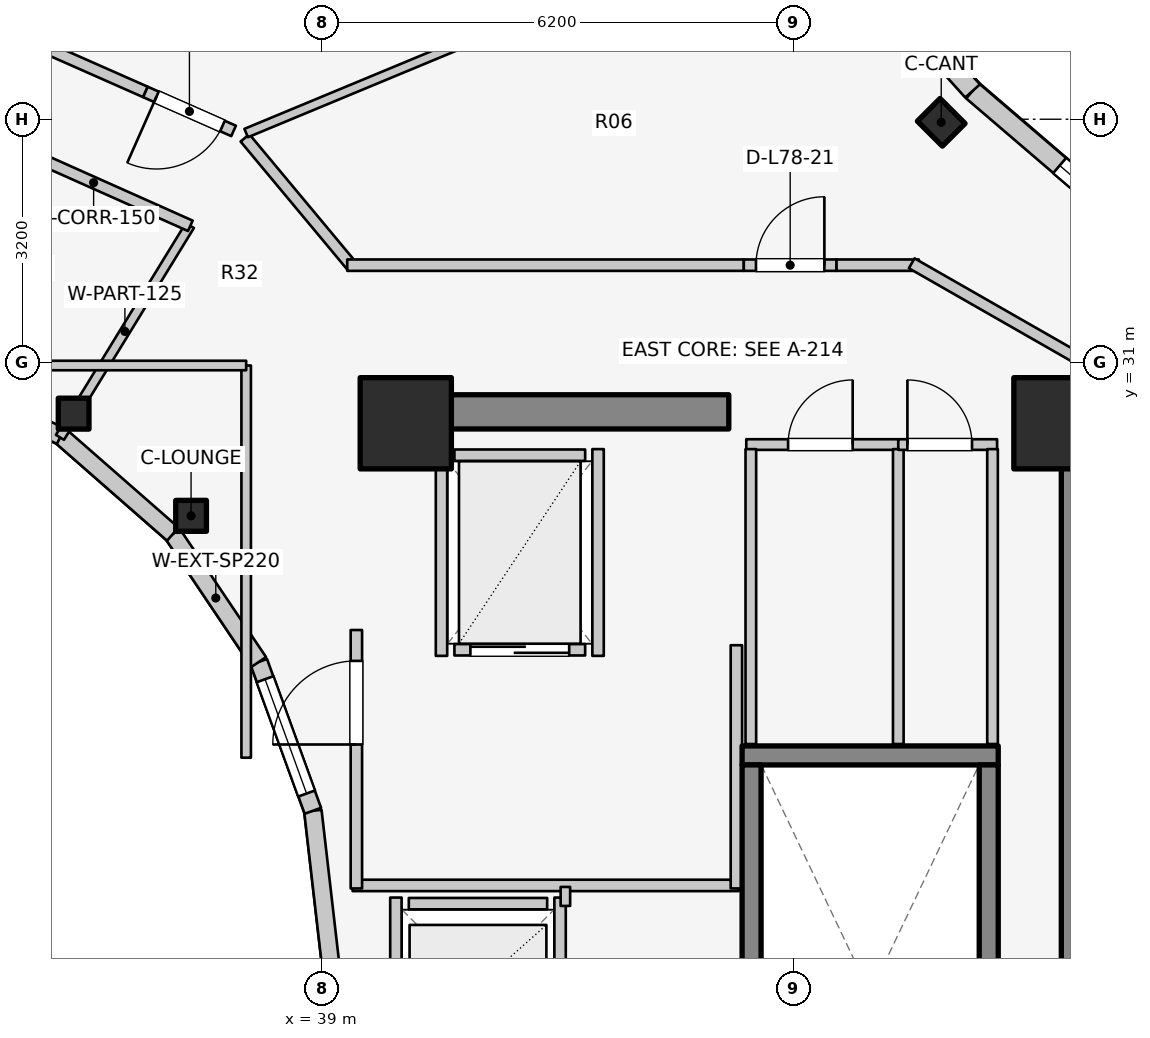
"""IFC4 building model, lengths in metres.
Left out: names, types, materials, properties, quantities, classifications, styles, units other than length and angle.
Written with IfcOpenShell. Run it as: python <this file> out.ifc"""

import sys

from ifc_helpers import new_model, si_unit, direction, frame, frame_2d, origin, origin_2d, place, context, subcontext, project, spatial, rectangle, i_section, extrude, element, fill, save


model = new_model("IFC4")
c1 = context("Model", 3, precision=1e-05, world=origin(), true_north=direction((0.0, 1.0)))
c2 = subcontext(c1, "Body", "Model", "MODEL_VIEW")
j1 = project(units=[si_unit("LENGTHUNIT", "METRE"), si_unit("PLANEANGLEUNIT", "RADIAN")], contexts=[c1])
p1 = place(None, origin())
s1 = spatial("IfcSite", under=j1, at=p1, CompositionType="ELEMENT")
p2 = place(p1, origin())
s2 = spatial("IfcBuilding", under=s1, at=p2, CompositionType="ELEMENT")
p3 = place(p2, frame((0.0, 0.0, 256.8)))
s3 = spatial("IfcBuildingStorey", under=s2, at=p3, CompositionType="ELEMENT", Elevation=256.8)
p4 = place(p3, frame((48.95, 17.05, 0.0), z_axis=(0.0, 0.0, 1.0), x_axis=(0.0, 1.0, 0.0)))
e1 = element("IfcWall", 1, at=p4, inside=s3, PredefinedType="SHEAR", context=c2, shape_type="SweptSolid", body=[
    extrude(rectangle(XDim=12.8, YDim=0.45, at=frame_2d((6.4, 0.0))), origin(), (0.0, 0.0, 1.0), 3.6),
])
p5 = place(p3, frame((39.85, 30.35, 0.0), z_axis=(0.0, 0.0, 1.0), x_axis=(1.0, 0.0, 0.0)))
e2 = element("IfcWall", 2, at=p5, inside=s3, PredefinedType="SHEAR", context=c2, shape_type="SweptSolid", body=[
    extrude(rectangle(XDim=4.5, YDim=0.45, at=frame_2d((2.25, 0.0))), origin(), (0.0, 0.0, 1.0), 3.6),
])
p6 = place(p3, frame((44.525, 25.83, 0.0), z_axis=(0.0, 0.0, 1.0), x_axis=(1.0, 0.0, 0.0)))
e3 = element("IfcWall", 3, at=p6, inside=s3, PredefinedType="SOLIDWALL", context=c2, shape_type="SweptSolid", body=[
    extrude(rectangle(XDim=3.37, YDim=0.25, at=frame_2d((1.685, 0.0))), origin(), (0.0, 0.0, 1.0), 3.6),
])
for number, where, z_axis, x_axis in (
    (4, (44.65, 17.895, 0.0), (0.0, 0.0, 1.0), (0.0, 1.0, 0.0)),
    (5, (47.77, 17.895, 0.0), (0.0, 0.0, 1.0), (0.0, 1.0, 0.0)),
):
    element("IfcWall", number, at=place(p3, frame(where, z_axis=z_axis, x_axis=x_axis)), inside=s3, PredefinedType="SOLIDWALL", context=c2, shape_type="SweptSolid", body=[
        extrude(rectangle(XDim=7.81, YDim=0.25, at=frame_2d((3.905, 0.0))), origin(), (0.0, 0.0, 1.0), 3.6),
    ])
for number, where, z_axis, x_axis in (
    (6, (48.7, 30.2, 0.0), (0.0, 0.0, 1.0), (1.0, 0.0, 0.0)),
    (7, (40.1, 30.2, 0.0), (0.0, 0.0, 1.0), (1.0, 0.0, 0.0)),
):
    element("IfcColumn", number, at=place(p3, frame(where, z_axis=z_axis, x_axis=x_axis)), inside=s3, PredefinedType="COLUMN", context=c2, shape_type="SweptSolid", body=[
        extrude(rectangle(XDim=1.2, YDim=1.2, at=origin_2d()), origin(), (0.0, 0.0, 1.0), 3.6),
    ])
p7 = place(p3, frame((37.275, 28.982, 0.0), z_axis=(0.0, 0.0, 1.0), x_axis=(1.0, 0.0, 0.0)))
e8 = element("IfcColumn", 8, at=p7, inside=s3, PredefinedType="COLUMN", context=c2, shape_type="SweptSolid", body=[
    extrude(i_section(OverallWidth=0.404, OverallDepth=0.407, WebThickness=0.027, FlangeThickness=0.044, FilletRadius=0.025, at=origin_2d()), origin(), (0.0, 0.0, 1.0), 3.6),
])
p8 = place(p3, frame((47.145, 34.159, 0.0), z_axis=(0.0, 0.0, 1.0), x_axis=(0.707106781187, 0.707106781187, 0.0)))
e9 = element("IfcColumn", 9, at=p8, inside=s3, PredefinedType="COLUMN", context=c2, shape_type="SweptSolid", body=[
    extrude(i_section(OverallWidth=0.422, OverallDepth=0.465, WebThickness=0.045, FlangeThickness=0.073, FilletRadius=0.025, at=origin_2d()), origin(), (0.0, 0.0, 1.0), 3.6),
])
p9 = place(p3, frame((35.73, 30.327, 0.0), z_axis=(0.0, 0.0, 1.0), x_axis=(1.0, 0.0, 0.0)))
e10 = element("IfcColumn", 10, at=p9, inside=s3, PredefinedType="COLUMN", context=c2, shape_type="SweptSolid", body=[
    extrude(i_section(OverallWidth=0.404, OverallDepth=0.407, WebThickness=0.027, FlangeThickness=0.044, FilletRadius=0.025, at=origin_2d()), origin(), (0.0, 0.0, 1.0), 3.6),
])
p10 = place(p3, frame((39.12, 23.0, 0.0), z_axis=(0.0, 0.0, 1.0), x_axis=(-0.114711713601, 0.993398823617, 0.0)))
e11 = element("IfcWall", 11, at=p10, inside=s3, PredefinedType="STANDARD", context=c2, shape_type="SweptSolid", body=[
    extrude(rectangle(XDim=2.115, YDim=0.23, at=frame_2d((1.058, 0.0))), origin(), (0.0, 0.0, 1.0), 3.06),
])
p11 = place(p3, frame((38.877, 25.102, 0.0), z_axis=(0.0, 0.0, 1.0), x_axis=(-0.341423187295, 0.93990968033, 0.0)))
e12 = element("IfcWall", 12, at=p11, inside=s3, PredefinedType="STANDARD", context=c2, shape_type="SweptSolid", body=[
    extrude(rectangle(XDim=2.084, YDim=0.23, at=frame_2d((1.042, 0.0))), origin(), (0.0, 0.0, 1.0), 3.06),
])
p12 = place(p11, frame((0.242, 0.0, 0.85)))
e13 = element("IfcOpeningElement", 13, at=p12, cuts=e12, PredefinedType="OPENING", context=c2, shape_type="SweptSolid", body=[
    extrude(rectangle(XDim=1.6, YDim=1.65, at=frame_2d((0.8, 0.825))), frame((0.0, 0.125, 0.0), z_axis=(0.0, -1.0, 0.0), x_axis=(1.0, 0.0, 0.0)), (0.0, 0.0, 1.0), 0.25),
])
p13 = place(p3, frame((38.166, 27.06, 0.0), z_axis=(0.0, 0.0, 1.0), x_axis=(-0.558197800898, 0.829707909492, 0.0)))
e14 = element("IfcWall", 14, at=p13, inside=s3, PredefinedType="STANDARD", context=c2, shape_type="SweptSolid", body=[
    extrude(rectangle(XDim=2.027, YDim=0.23, at=frame_2d((1.013, 0.0))), origin(), (0.0, 0.0, 1.0), 1.72),
])
p14 = place(p3, frame((37.035, 28.742, 0.0), z_axis=(0.0, 0.0, 1.0), x_axis=(-0.752576694707, 0.658504607869, 0.0)))
e15 = element("IfcWall", 15, at=p14, inside=s3, PredefinedType="STANDARD", context=c2, shape_type="SweptSolid", body=[
    extrude(rectangle(XDim=1.959, YDim=0.23, at=frame_2d((0.98, 0.0))), origin(), (0.0, 0.0, 1.0), 1.72),
])
p15 = place(p3, frame((35.56, 30.032, 0.0), z_axis=(0.0, 0.0, 1.0), x_axis=(-0.904179699603, 0.427152280606, 0.0)))
e16 = element("IfcWall", 16, at=p15, inside=s3, PredefinedType="STANDARD", context=c2, shape_type="SweptSolid", body=[
    extrude(rectangle(XDim=1.899, YDim=0.23, at=frame_2d((0.95, 0.0))), origin(), (0.0, 0.0, 1.0), 1.72),
])
p16 = place(p3, frame((50.761, 31.829, 0.0), z_axis=(0.0, 0.0, 1.0), x_axis=(-0.759587504333, 0.650405122413, 0.0)))
e17 = element("IfcWall", 17, at=p16, inside=s3, PredefinedType="STANDARD", context=c2, shape_type="SweptSolid", body=[
    extrude(rectangle(XDim=4.217, YDim=0.26, at=frame_2d((2.109, 0.0))), origin(), (0.0, 0.0, 1.0), 1.72),
])
p17 = place(p16, frame((1.509, 0.0, 0.15)))
e18 = element("IfcOpeningElement", 18, at=p17, cuts=e17, PredefinedType="OPENING", context=c2, shape_type="SweptSolid", body=[
    extrude(rectangle(XDim=1.2, YDim=0.9, at=frame_2d((0.6, 0.45))), frame((0.0, 0.14, 0.0), z_axis=(0.0, -1.0, 0.0), x_axis=(1.0, 0.0, 0.0)), (0.0, 0.0, 1.0), 0.28),
])
p18 = place(p3, frame((47.558, 34.572, 0.0), z_axis=(0.0, 0.0, 1.0), x_axis=(-0.668903560134, 0.743349196031, 0.0)))
e19 = element("IfcWall", 19, at=p18, inside=s3, PredefinedType="STANDARD", context=c2, shape_type="SweptSolid", body=[
    extrude(rectangle(XDim=5.513, YDim=0.26, at=frame_2d((2.756, 0.0))), origin(), (0.0, 0.0, 1.0), 1.72),
])
p19 = place(p3, frame((40.14, 23.88, 0.0), z_axis=(0.0, 0.0, 1.0), x_axis=(1.0, 0.0, 0.0)))
e20 = element("IfcWall", 20, at=p19, inside=s3, PredefinedType="SOLIDWALL", context=c2, shape_type="SweptSolid", body=[
    extrude(rectangle(XDim=1.82, YDim=0.15, at=frame_2d((0.91, 0.0))), origin(), (0.0, 0.0, 1.0), 2.62),
])
p20 = place(p3, frame((39.97, 21.64, 0.0), z_axis=(0.0, 0.0, 1.0), x_axis=(0.0, 1.0, 0.0)))
e21 = element("IfcWall", 21, at=p20, inside=s3, PredefinedType="SOLIDWALL", context=c2, shape_type="SweptSolid", body=[
    extrude(rectangle(XDim=2.32, YDim=0.15, at=frame_2d((1.16, 0.0))), origin(), (0.0, 0.0, 1.0), 2.62),
])
p21 = place(p3, frame((42.13, 21.64, 0.0), z_axis=(0.0, 0.0, 1.0), x_axis=(0.0, 1.0, 0.0)))
e22 = element("IfcWall", 22, at=p21, inside=s3, PredefinedType="SOLIDWALL", context=c2, shape_type="SweptSolid", body=[
    extrude(rectangle(XDim=2.32, YDim=0.15, at=frame_2d((1.16, 0.0))), origin(), (0.0, 0.0, 1.0), 3.075),
])
p22 = place(p3, frame((40.74, 27.22, 0.0), z_axis=(0.0, 0.0, 1.0), x_axis=(1.0, 0.0, 0.0)))
e23 = element("IfcWall", 23, at=p22, inside=s3, PredefinedType="SOLIDWALL", context=c2, shape_type="SweptSolid", body=[
    extrude(rectangle(XDim=1.72, YDim=0.15, at=frame_2d((0.86, 0.0))), origin(), (0.0, 0.0, 1.0), 3.075),
])
p23 = place(p22, frame((0.21, 0.0, 0.0)))
e24 = element("IfcOpeningElement", 24, at=p23, cuts=e23, PredefinedType="OPENING", context=c2, shape_type="SweptSolid", body=[
    extrude(rectangle(XDim=1.3, YDim=2.1, at=frame_2d((0.65, 1.05))), frame((0.0, 0.085, 0.0), z_axis=(0.0, -1.0, 0.0), x_axis=(1.0, 0.0, 0.0)), (0.0, 0.0, 1.0), 0.17),
])
p24 = place(p3, frame((40.74, 29.78, 0.0), z_axis=(0.0, 0.0, 1.0), x_axis=(1.0, 0.0, 0.0)))
e25 = element("IfcWall", 25, at=p24, inside=s3, PredefinedType="SOLIDWALL", context=c2, shape_type="SweptSolid", body=[
    extrude(rectangle(XDim=1.72, YDim=0.15, at=frame_2d((0.86, 0.0))), origin(), (0.0, 0.0, 1.0), 3.075),
])
for number, where, z_axis, x_axis in (
    (26, (40.57, 27.14, 0.0), (0.0, 0.0, 1.0), (0.0, 1.0, 0.0)),
    (27, (42.63, 27.14, 0.0), (0.0, 0.0, 1.0), (0.0, 1.0, 0.0)),
):
    element("IfcWall", number, at=place(p3, frame(where, z_axis=z_axis, x_axis=x_axis)), inside=s3, PredefinedType="SOLIDWALL", context=c2, shape_type="SweptSolid", body=[
        extrude(rectangle(XDim=2.72, YDim=0.15, at=frame_2d((1.36, 0.0))), origin(), (0.0, 0.0, 1.0), 3.075),
    ])
p25 = place(p3, frame((39.4, 24.12, 0.0), z_axis=(0.0, 0.0, 1.0), x_axis=(1.0, 0.0, 0.0)))
e28 = element("IfcWall", 28, at=p25, inside=s3, PredefinedType="PARTITIONING", context=c2, shape_type="SweptSolid", body=[
    extrude(rectangle(XDim=5.08, YDim=0.15, at=frame_2d((2.54, 0.0))), origin(), (0.0, 0.0, 1.0), 2.62),
])
p26 = place(p3, frame((44.45, 24.08, 0.0), z_axis=(0.0, 0.0, 1.0), x_axis=(0.0, 1.0, 0.0)))
e29 = element("IfcWall", 29, at=p26, inside=s3, PredefinedType="PARTITIONING", context=c2, shape_type="SweptSolid", body=[
    extrude(rectangle(XDim=3.2, YDim=0.15, at=frame_2d((1.6, 0.0))), origin(), (0.0, 0.0, 1.0), 3.075),
])
p27 = place(p3, frame((39.45, 24.08, 0.0), z_axis=(0.0, 0.0, 1.0), x_axis=(0.0, 1.0, 0.0)))
e30 = element("IfcWall", 30, at=p27, inside=s3, PredefinedType="PARTITIONING", context=c2, shape_type="SweptSolid", body=[
    extrude(rectangle(XDim=3.4, YDim=0.15, at=frame_2d((1.7, 0.0))), origin(), (0.0, 0.0, 1.0), 3.075),
])
p28 = place(p27, frame((1.894, 0.0, 0.0)))
e31 = element("IfcOpeningElement", 31, at=p28, cuts=e30, PredefinedType="OPENING", context=c2, shape_type="SweptSolid", body=[
    extrude(rectangle(XDim=1.1, YDim=2.1, at=frame_2d((0.55, 1.05))), frame((0.0, 0.085, 0.0), z_axis=(0.0, -1.0, 0.0), x_axis=(1.0, 0.0, 0.0)), (0.0, 0.0, 1.0), 0.17),
])
p29 = place(p3, frame((42.2, 23.85, 0.0), z_axis=(0.0, 0.0, 1.0), x_axis=(0.0, 1.0, 0.0)))
e32 = element("IfcWall", 32, at=p29, inside=s3, PredefinedType="PARTITIONING", context=c2, shape_type="SweptSolid", body=[
    extrude(rectangle(XDim=0.25, YDim=0.125, at=frame_2d((0.125, 0.0))), origin(), (0.0, 0.0, 1.0), 3.075),
])
p30 = place(p3, frame((44.58, 29.92, 0.0), z_axis=(0.0, 0.0, 1.0), x_axis=(1.0, 0.0, 0.0)))
e33 = element("IfcWall", 33, at=p30, inside=s3, PredefinedType="PLUMBINGWALL", context=c2, shape_type="SweptSolid", body=[
    extrude(rectangle(XDim=2.0, YDim=0.14, at=frame_2d((1.0, 0.0))), origin(), (0.0, 0.0, 1.0), 3.075),
])
p31 = place(p30, frame((0.55, 0.0, 0.0)))
e34 = element("IfcOpeningElement", 34, at=p31, cuts=e33, PredefinedType="OPENING", context=c2, shape_type="SweptSolid", body=[
    extrude(rectangle(XDim=0.85, YDim=2.05, at=frame_2d((0.425, 1.025))), frame((0.0, 0.08, 0.0), z_axis=(0.0, -1.0, 0.0), x_axis=(1.0, 0.0, 0.0)), (0.0, 0.0, 1.0), 0.16),
])
for number, where, z_axis, x_axis in (
    (35, (44.64, 25.98, 0.0), (0.0, 0.0, 1.0), (0.0, 1.0, 0.0)),
    (36, (46.58, 25.98, 0.0), (0.0, 0.0, 1.0), (0.0, 1.0, 0.0)),
):
    element("IfcWall", number, at=place(p3, frame(where, z_axis=z_axis, x_axis=x_axis)), inside=s3, PredefinedType="PLUMBINGWALL", context=c2, shape_type="SweptSolid", body=[
        extrude(rectangle(XDim=3.88, YDim=0.14, at=frame_2d((1.94, 0.0))), origin(), (0.0, 0.0, 1.0), 3.075),
    ])
p32 = place(p3, frame((46.58, 29.92, 0.0), z_axis=(0.0, 0.0, 1.0), x_axis=(1.0, 0.0, 0.0)))
e37 = element("IfcWall", 37, at=p32, inside=s3, PredefinedType="PLUMBINGWALL", context=c2, shape_type="SweptSolid", body=[
    extrude(rectangle(XDim=1.3, YDim=0.14, at=frame_2d((0.65, 0.0))), origin(), (0.0, 0.0, 1.0), 3.075),
])
p33 = place(p32, frame((0.12, 0.0, 0.0)))
e38 = element("IfcOpeningElement", 38, at=p33, cuts=e37, PredefinedType="OPENING", context=c2, shape_type="SweptSolid", body=[
    extrude(rectangle(XDim=0.85, YDim=2.05, at=frame_2d((0.425, 1.025))), frame((0.0, 0.08, 0.0), z_axis=(0.0, -1.0, 0.0), x_axis=(1.0, 0.0, 0.0)), (0.0, 0.0, 1.0), 0.16),
])
p34 = place(p3, frame((47.82, 25.98, 0.0), z_axis=(0.0, 0.0, 1.0), x_axis=(0.0, 1.0, 0.0)))
e39 = element("IfcWall", 39, at=p34, inside=s3, PredefinedType="PLUMBINGWALL", context=c2, shape_type="SweptSolid", body=[
    extrude(rectangle(XDim=3.88, YDim=0.14, at=frame_2d((1.94, 0.0))), origin(), (0.0, 0.0, 1.0), 3.075),
])
p35 = place(p3, frame((35.55, 30.015, 0.0), z_axis=(0.0, 0.0, 1.0), x_axis=(0.522763432117, 0.852477796802, 0.0)))
e40 = element("IfcWall", 40, at=p35, inside=s3, PredefinedType="PARTITIONING", context=c2, shape_type="SweptSolid", body=[
    extrude(rectangle(XDim=3.269, YDim=0.125, at=frame_2d((1.635, 0.0))), origin(), (0.0, 0.0, 1.0), 1.72),
])
p36 = place(p3, frame((37.265, 32.798, 0.0), z_axis=(0.0, 0.0, 1.0), x_axis=(-0.913254317828, 0.407389924971, 0.0)))
e41 = element("IfcWall", 41, at=p36, inside=s3, PredefinedType="PARTITIONING", context=c2, shape_type="SweptSolid", body=[
    extrude(rectangle(XDim=2.787, YDim=0.15, at=frame_2d((1.393, 0.0))), origin(), (0.0, 0.0, 1.0), 1.72),
])
p37 = place(p3, frame((38.0, 25.8, 0.0), z_axis=(0.0, 0.0, 1.0), x_axis=(0.0, 1.0, 0.0)))
e42 = element("IfcWall", 42, at=p37, inside=s3, PredefinedType="PARTITIONING", context=c2, shape_type="SweptSolid", body=[
    extrude(rectangle(XDim=5.16, YDim=0.125, at=frame_2d((2.58, 0.0))), origin(), (0.0, 0.0, 1.0), 2.452),
])
p38 = place(p3, frame((35.4, 30.96, 0.0), z_axis=(0.0, 0.0, 1.0), x_axis=(1.0, 0.0, 0.0)))
e43 = element("IfcWall", 43, at=p38, inside=s3, PredefinedType="PARTITIONING", context=c2, shape_type="SweptSolid", body=[
    extrude(rectangle(XDim=2.6, YDim=0.125, at=frame_2d((1.3, 0.0))), origin(), (0.0, 0.0, 1.0), 1.72),
])
p39 = place(p3, frame((37.984, 33.955, 0.0), z_axis=(0.0, 0.0, 1.0), x_axis=(0.64030392053, -0.76812166312, 0.0)))
e44 = element("IfcWall", 44, at=p39, inside=s3, PredefinedType="PARTITIONING", context=c2, shape_type="SweptSolid", body=[
    extrude(rectangle(XDim=2.21, YDim=0.15, at=frame_2d((1.105, 0.0))), origin(), (0.0, 0.0, 1.0), 1.72),
])
p40 = place(p3, frame((39.33, 32.28, 0.0), z_axis=(0.0, 0.0, 1.0), x_axis=(1.0, 0.0, 0.0)))
e45 = element("IfcWall", 45, at=p40, inside=s3, PredefinedType="PARTITIONING", context=c2, shape_type="SweptSolid", body=[
    extrude(rectangle(XDim=5.218, YDim=0.15, at=frame_2d((2.609, 0.0))), origin(), (0.0, 0.0, 1.0), 1.72),
])
p41 = place(p3, frame((44.548, 32.28, 0.0), z_axis=(0.0, 0.0, 1.0), x_axis=(1.0, 0.0, 0.0)))
e46 = element("IfcWall", 46, at=p41, inside=s3, PredefinedType="PARTITIONING", context=c2, shape_type="SweptSolid", body=[
    extrude(rectangle(XDim=1.22, YDim=0.15, at=frame_2d((0.61, 0.0))), origin(), (0.0, 0.0, 1.0), 2.16),
])
p42 = place(p41, frame((0.16, 0.0, 0.0)))
e47 = element("IfcOpeningElement", 47, at=p42, cuts=e46, PredefinedType="OPENING", context=c2, shape_type="SweptSolid", body=[
    extrude(rectangle(XDim=0.9, YDim=2.1, at=frame_2d((0.45, 1.05))), frame((0.0, 0.085, 0.0), z_axis=(0.0, -1.0, 0.0), x_axis=(1.0, 0.0, 0.0)), (0.0, 0.0, 1.0), 0.17),
])
p43 = place(p3, frame((45.768, 32.28, 0.0), z_axis=(0.0, 0.0, 1.0), x_axis=(1.0, 0.0, 0.0)))
e48 = element("IfcWall", 48, at=p43, inside=s3, PredefinedType="PARTITIONING", context=c2, shape_type="SweptSolid", body=[
    extrude(rectangle(XDim=1.083, YDim=0.15, at=frame_2d((0.541, 0.0))), origin(), (0.0, 0.0, 1.0), 3.075),
])
p44 = place(p3, frame((46.757, 32.305, 0.0), z_axis=(0.0, 0.0, 1.0), x_axis=(0.867991349648, -0.496579315857, 0.0)))
e49 = element("IfcWall", 49, at=p44, inside=s3, PredefinedType="PARTITIONING", context=c2, shape_type="SweptSolid", body=[
    extrude(rectangle(XDim=2.567, YDim=0.15, at=frame_2d((1.283, 0.0))), origin(), (0.0, 0.0, 1.0), 1.72),
])
p45 = place(p3, frame((38.0, 34.018, 0.0), z_axis=(0.0, 0.0, 1.0), x_axis=(0.92349333748, 0.383614462228, 0.0)))
e50 = element("IfcWall", 50, at=p45, inside=s3, PredefinedType="MOVABLE", context=c2, shape_type="SweptSolid", body=[
    extrude(rectangle(XDim=5.907, YDim=0.12, at=frame_2d((2.954, 0.0))), origin(), (0.0, 0.0, 1.0), 1.72),
])
p46 = place(p3, frame((37.834, 34.046, 0.0), z_axis=(0.0, 0.0, 1.0), x_axis=(-0.914641976237, 0.404264833129, 0.0)))
e51 = element("IfcWall", 51, at=p46, inside=s3, PredefinedType="PARTITIONING", context=c2, shape_type="SweptSolid", body=[
    extrude(rectangle(XDim=1.27, YDim=0.15, at=frame_2d((0.635, 0.0))), origin(), (0.0, 0.0, 1.0), 2.16),
])
p47 = place(p46, frame((0.16, 0.0, 0.0)))
e52 = element("IfcOpeningElement", 52, at=p47, cuts=e51, PredefinedType="OPENING", context=c2, shape_type="SweptSolid", body=[
    extrude(rectangle(XDim=0.95, YDim=2.1, at=frame_2d((0.475, 1.05))), frame((0.0, 0.085, 0.0), z_axis=(0.0, -1.0, 0.0), x_axis=(1.0, 0.0, 0.0)), (0.0, 0.0, 1.0), 0.17),
])
p48 = place(p3, frame((36.673, 34.56, 0.0), z_axis=(0.0, 0.0, 1.0), x_axis=(-0.914643439219, 0.404261523143, 0.0)))
e53 = element("IfcWall", 53, at=p48, inside=s3, PredefinedType="PARTITIONING", context=c2, shape_type="SweptSolid", body=[
    extrude(rectangle(XDim=1.751, YDim=0.15, at=frame_2d((0.875, 0.0))), origin(), (0.0, 0.0, 1.0), 1.72),
])
p49 = place(p12, origin())
e54 = element("IfcWindow", 54, at=p49, inside=s3, PartitioningType="SINGLE_PANEL", PredefinedType="WINDOW", context=c2, shape_type="SweptSolid", body=[
    extrude(rectangle(XDim=1.6, YDim=1.65, at=frame_2d((0.8, 0.825))), frame((0.0, 0.03, 0.0), z_axis=(0.0, -1.0, 0.0), x_axis=(1.0, 0.0, 0.0)), (0.0, 0.0, 1.0), 0.06),
])
fill(e13, e54)
p50 = place(p17, origin())
e55 = element("IfcWindow", 55, at=p50, inside=s3, PartitioningType="SINGLE_PANEL", PredefinedType="WINDOW", context=c2, shape_type="SweptSolid", body=[
    extrude(rectangle(XDim=1.2, YDim=0.9, at=frame_2d((0.6, 0.45))), frame((0.0, 0.03, 0.0), z_axis=(0.0, -1.0, 0.0), x_axis=(1.0, 0.0, 0.0)), (0.0, 0.0, 1.0), 0.06),
])
fill(e18, e55)
p51 = place(p23, origin())
e56 = element("IfcDoor", 56, at=p51, inside=s3, OperationType="DOUBLE_DOOR_SLIDING", PredefinedType="DOOR", context=c2, shape_type="SweptSolid", body=[
    extrude(rectangle(XDim=1.3, YDim=2.1, at=frame_2d((0.65, 1.05))), frame((0.0, 0.025, 0.0), z_axis=(0.0, -1.0, 0.0), x_axis=(1.0, 0.0, 0.0)), (0.0, 0.0, 1.0), 0.05),
])
fill(e24, e56)
p52 = place(p28, origin())
e57 = element("IfcDoor", 57, at=p52, inside=s3, OperationType="SINGLE_SWING_LEFT", PredefinedType="DOOR", context=c2, shape_type="SweptSolid", body=[
    extrude(rectangle(XDim=1.1, YDim=2.1, at=frame_2d((0.55, 1.05))), frame((0.0, 0.025, 0.0), z_axis=(0.0, -1.0, 0.0), x_axis=(1.0, 0.0, 0.0)), (0.0, 0.0, 1.0), 0.05),
])
fill(e31, e57)
p53 = place(p31, origin())
e58 = element("IfcDoor", 58, at=p53, inside=s3, OperationType="SINGLE_SWING_RIGHT", PredefinedType="DOOR", context=c2, shape_type="SweptSolid", body=[
    extrude(rectangle(XDim=0.85, YDim=2.05, at=frame_2d((0.425, 1.025))), frame((0.0, 0.025, 0.0), z_axis=(0.0, -1.0, 0.0), x_axis=(1.0, 0.0, 0.0)), (0.0, 0.0, 1.0), 0.05),
])
fill(e34, e58)
p54 = place(p33, origin())
e59 = element("IfcDoor", 59, at=p54, inside=s3, OperationType="SINGLE_SWING_LEFT", PredefinedType="DOOR", context=c2, shape_type="SweptSolid", body=[
    extrude(rectangle(XDim=0.85, YDim=2.05, at=frame_2d((0.425, 1.025))), frame((0.0, 0.025, 0.0), z_axis=(0.0, -1.0, 0.0), x_axis=(1.0, 0.0, 0.0)), (0.0, 0.0, 1.0), 0.05),
])
fill(e38, e59)
p55 = place(p42, origin())
e60 = element("IfcDoor", 60, at=p55, inside=s3, OperationType="SINGLE_SWING_RIGHT", PredefinedType="DOOR", context=c2, shape_type="SweptSolid", body=[
    extrude(rectangle(XDim=0.9, YDim=2.1, at=frame_2d((0.45, 1.05))), frame((0.0, 0.025, 0.0), z_axis=(0.0, -1.0, 0.0), x_axis=(1.0, 0.0, 0.0)), (0.0, 0.0, 1.0), 0.05),
])
fill(e47, e60)
p56 = place(p47, origin())
e61 = element("IfcDoor", 61, at=p56, inside=s3, OperationType="SINGLE_SWING_RIGHT", PredefinedType="DOOR", context=c2, shape_type="SweptSolid", body=[
    extrude(rectangle(XDim=0.95, YDim=2.1, at=frame_2d((0.475, 1.05))), frame((0.0, 0.025, 0.0), z_axis=(0.0, -1.0, 0.0), x_axis=(1.0, 0.0, 0.0)), (0.0, 0.0, 1.0), 0.05),
])
fill(e52, e61)
save(model, sys.argv[1])
